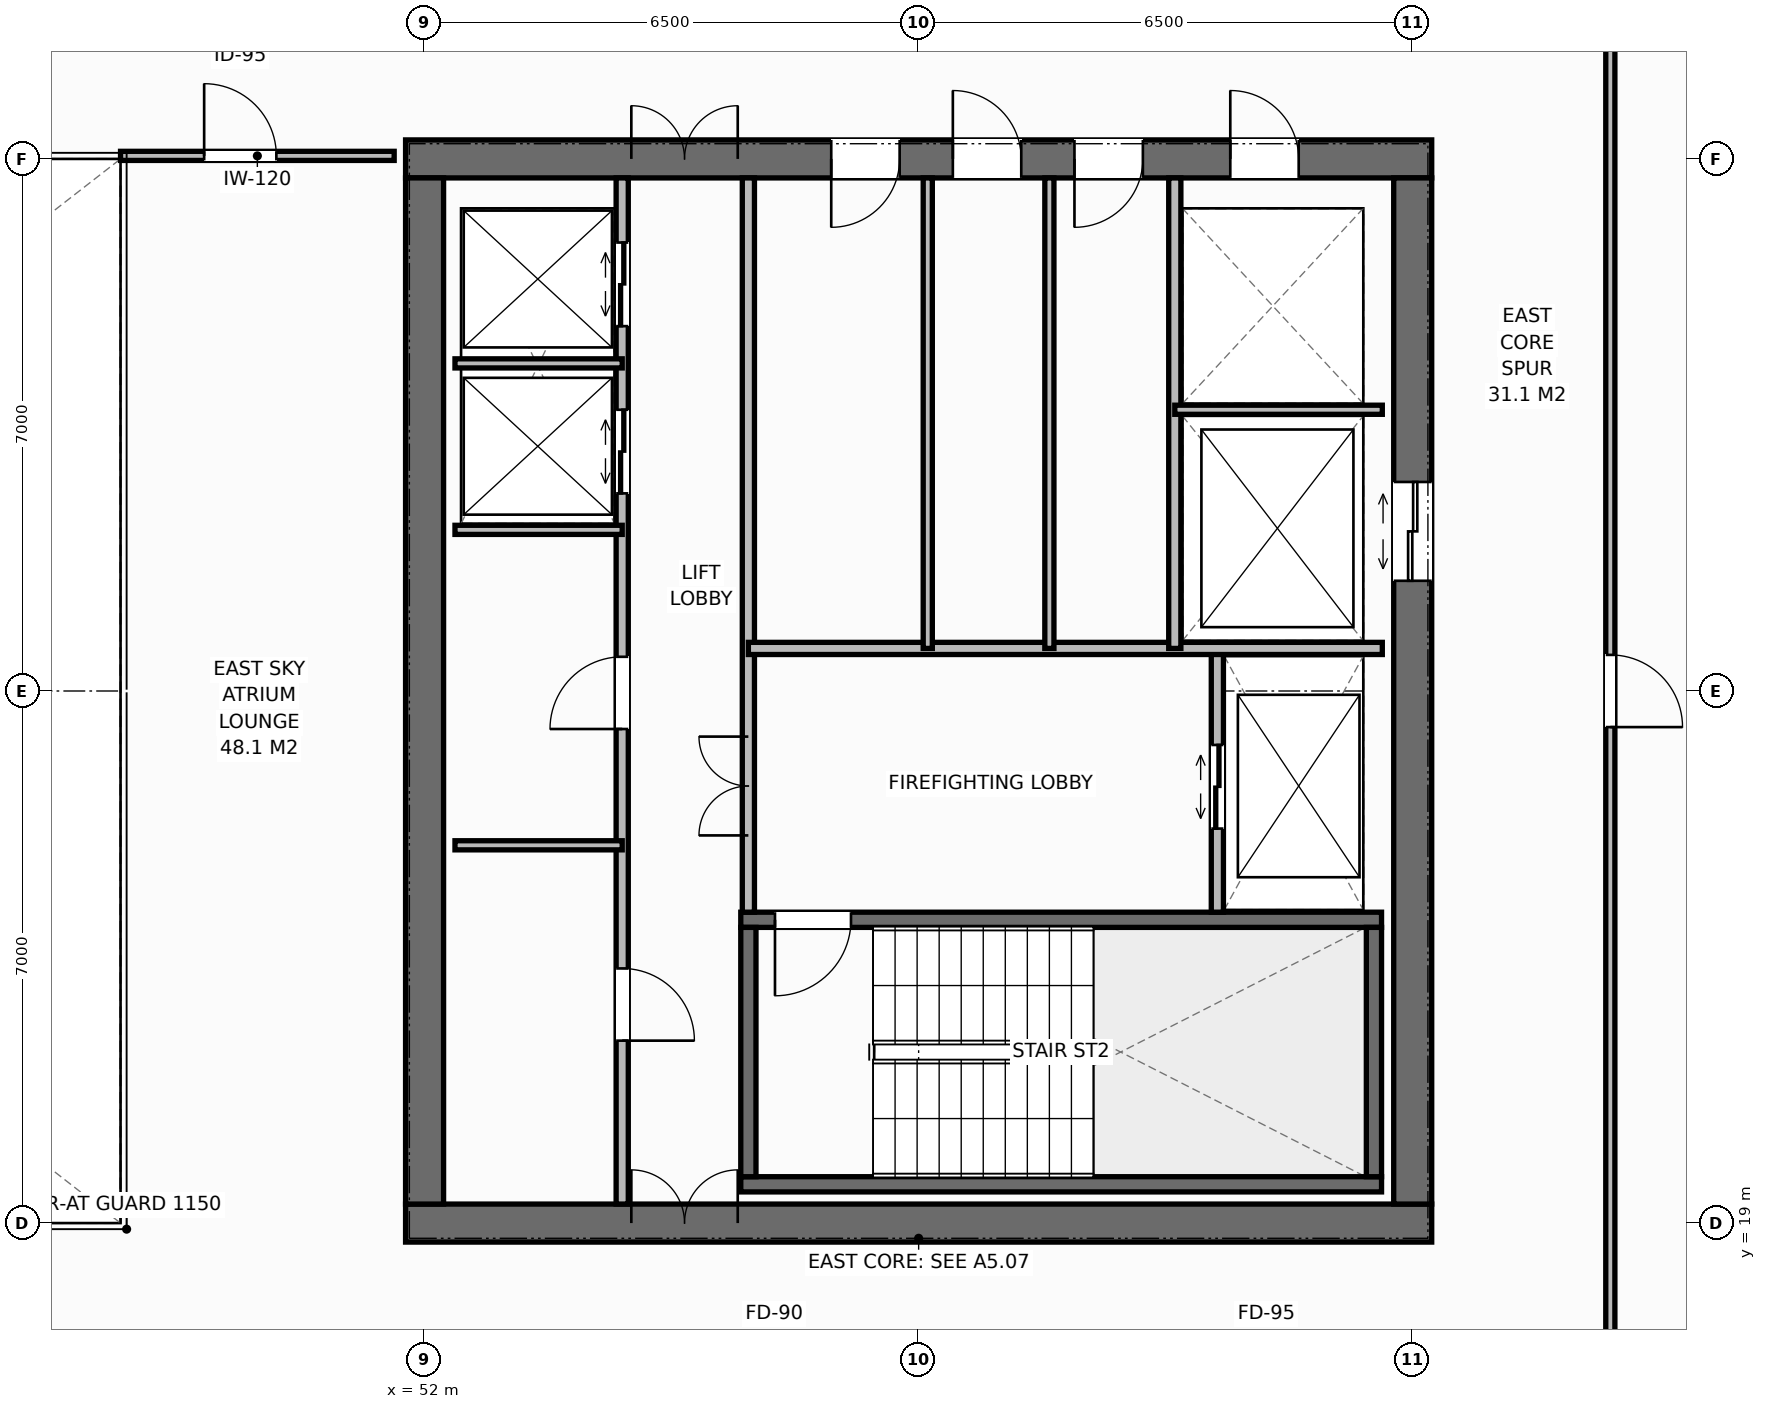
"""IFC4 building model, lengths in metres.
Left out: names, types, materials, properties, quantities, classifications, styles, units other than length and angle.
Written with IfcOpenShell. Run it as: python <this file> out.ifc"""

import sys

from ifc_helpers import new_model, si_unit, direction, frame, frame_2d, origin, place, context, subcontext, project, spatial, rectangle, extrude, element, fill, save


model = new_model("IFC4")
c1 = context("Model", 3, precision=1e-05, world=origin(), true_north=direction((0.0, 1.0)))
c2 = subcontext(c1, "Body", "Model", "MODEL_VIEW")
j1 = project(units=[si_unit("LENGTHUNIT", "METRE"), si_unit("PLANEANGLEUNIT", "RADIAN")], contexts=[c1])
p1 = place(None, origin())
s1 = spatial("IfcSite", under=j1, at=p1, CompositionType="ELEMENT")
p2 = place(p1, origin())
s2 = spatial("IfcBuilding", under=s1, at=p2, CompositionType="ELEMENT")
p3 = place(p2, frame((0.0, 0.0, 217.6)))
s3 = spatial("IfcBuildingStorey", under=s2, at=p3, CompositionType="ELEMENT", Elevation=217.6)
p4 = place(p3, frame((51.75, 19.0, 0.0), z_axis=(0.0, 0.0, 1.0), x_axis=(1.0, 0.0, 0.0)))
e1 = element("IfcWall", 1, at=p4, inside=s3, PredefinedType="SHEAR", context=c2, shape_type="SweptSolid", body=[
    extrude(rectangle(XDim=13.5, YDim=0.5, at=frame_2d((6.75, 0.0))), origin(), (0.0, 0.0, 1.0), 3.8),
])
p5 = place(p4, frame((2.97, 0.0, 0.0)))
e2 = element("IfcOpeningElement", 2, at=p5, cuts=e1, PredefinedType="OPENING", context=c2, shape_type="SweptSolid", body=[
    extrude(rectangle(XDim=1.4, YDim=2.2, at=frame_2d((0.7, 1.1))), frame((0.0, 0.26, 0.0), z_axis=(0.0, -1.0, 0.0), x_axis=(1.0, 0.0, 0.0)), (0.0, 0.0, 1.0), 0.52),
])
p6 = place(p3, frame((51.75, 33.0, 0.0), z_axis=(0.0, 0.0, 1.0), x_axis=(1.0, 0.0, 0.0)))
e3 = element("IfcWall", 3, at=p6, inside=s3, PredefinedType="SHEAR", context=c2, shape_type="SweptSolid", body=[
    extrude(rectangle(XDim=13.5, YDim=0.5, at=frame_2d((6.75, 0.0))), origin(), (0.0, 0.0, 1.0), 3.8),
])
p7 = place(p6, frame((2.97, 0.0, 0.0)))
e4 = element("IfcOpeningElement", 4, at=p7, cuts=e3, PredefinedType="OPENING", context=c2, shape_type="SweptSolid", body=[
    extrude(rectangle(XDim=1.4, YDim=2.2, at=frame_2d((0.7, 1.1))), frame((0.0, 0.26, 0.0), z_axis=(0.0, -1.0, 0.0), x_axis=(1.0, 0.0, 0.0)), (0.0, 0.0, 1.0), 0.52),
])
p8 = place(p6, frame((10.85, 0.0, 0.0)))
e5 = element("IfcOpeningElement", 5, at=p8, cuts=e3, PredefinedType="OPENING", context=c2, shape_type="SweptSolid", body=[
    extrude(rectangle(XDim=0.9, YDim=2.15, at=frame_2d((0.45, 1.075))), frame((0.0, 0.26, 0.0), z_axis=(0.0, -1.0, 0.0), x_axis=(1.0, 0.0, 0.0)), (0.0, 0.0, 1.0), 0.52),
])
p9 = place(p6, frame((5.6, 0.0, 0.0)))
e6 = element("IfcOpeningElement", 6, at=p9, cuts=e3, PredefinedType="OPENING", context=c2, shape_type="SweptSolid", body=[
    extrude(rectangle(XDim=0.9, YDim=2.15, at=frame_2d((0.45, 1.075))), frame((0.0, 0.26, 0.0), z_axis=(0.0, -1.0, 0.0), x_axis=(1.0, 0.0, 0.0)), (0.0, 0.0, 1.0), 0.52),
])
p10 = place(p6, frame((7.2, 0.0, 0.0)))
e7 = element("IfcOpeningElement", 7, at=p10, cuts=e3, PredefinedType="OPENING", context=c2, shape_type="SweptSolid", body=[
    extrude(rectangle(XDim=0.9, YDim=2.15, at=frame_2d((0.45, 1.075))), frame((0.0, 0.26, 0.0), z_axis=(0.0, -1.0, 0.0), x_axis=(1.0, 0.0, 0.0)), (0.0, 0.0, 1.0), 0.52),
])
p11 = place(p6, frame((8.8, 0.0, 0.0)))
e8 = element("IfcOpeningElement", 8, at=p11, cuts=e3, PredefinedType="OPENING", context=c2, shape_type="SweptSolid", body=[
    extrude(rectangle(XDim=0.9, YDim=2.15, at=frame_2d((0.45, 1.075))), frame((0.0, 0.26, 0.0), z_axis=(0.0, -1.0, 0.0), x_axis=(1.0, 0.0, 0.0)), (0.0, 0.0, 1.0), 0.52),
])
p12 = place(p3, frame((52.0, 19.25, 0.0), z_axis=(0.0, 0.0, 1.0), x_axis=(0.0, 1.0, 0.0)))
e9 = element("IfcWall", 9, at=p12, inside=s3, PredefinedType="SHEAR", context=c2, shape_type="SweptSolid", body=[
    extrude(rectangle(XDim=13.5, YDim=0.5, at=frame_2d((6.75, 0.0))), origin(), (0.0, 0.0, 1.0), 3.8),
])
p13 = place(p3, frame((65.0, 19.25, 0.0), z_axis=(0.0, 0.0, 1.0), x_axis=(0.0, 1.0, 0.0)))
e10 = element("IfcWall", 10, at=p13, inside=s3, PredefinedType="SHEAR", context=c2, shape_type="SweptSolid", body=[
    extrude(rectangle(XDim=13.5, YDim=0.5, at=frame_2d((6.75, 0.0))), origin(), (0.0, 0.0, 1.0), 3.8),
])
p14 = place(p13, frame((8.2, 0.0, 0.0)))
e11 = element("IfcOpeningElement", 11, at=p14, cuts=e10, PredefinedType="OPENING", context=c2, shape_type="SweptSolid", body=[
    extrude(rectangle(XDim=1.3, YDim=2.2, at=frame_2d((0.65, 1.1))), frame((0.0, 0.26, 0.0), z_axis=(0.0, -1.0, 0.0), x_axis=(1.0, 0.0, 0.0)), (0.0, 0.0, 1.0), 0.52),
])
p15 = place(p3, frame((56.16, 19.51, 0.0), z_axis=(0.0, 0.0, 1.0), x_axis=(1.0, 0.0, 0.0)))
e12 = element("IfcWall", 12, at=p15, inside=s3, PredefinedType="SHEAR", context=c2, shape_type="SweptSolid", body=[
    extrude(rectangle(XDim=8.43, YDim=0.2, at=frame_2d((4.215, 0.0))), origin(), (0.0, 0.0, 1.0), 3.8),
])
p16 = place(p3, frame((56.16, 22.99, 0.0), z_axis=(0.0, 0.0, 1.0), x_axis=(1.0, 0.0, 0.0)))
e13 = element("IfcWall", 13, at=p16, inside=s3, PredefinedType="SHEAR", context=c2, shape_type="SweptSolid", body=[
    extrude(rectangle(XDim=8.43, YDim=0.2, at=frame_2d((4.215, 0.0))), origin(), (0.0, 0.0, 1.0), 3.8),
])
p17 = place(p16, frame((0.45, 0.0, 0.0)))
e14 = element("IfcOpeningElement", 14, at=p17, cuts=e13, PredefinedType="OPENING", context=c2, shape_type="SweptSolid", body=[
    extrude(rectangle(XDim=1.0, YDim=2.15, at=frame_2d((0.5, 1.075))), frame((0.0, 0.11, 0.0), z_axis=(0.0, -1.0, 0.0), x_axis=(1.0, 0.0, 0.0)), (0.0, 0.0, 1.0), 0.22),
])
for number, where, z_axis, x_axis in (
    (15, (56.26, 19.61, 0.0), (0.0, 0.0, 1.0), (0.0, 1.0, 0.0)),
    (16, (64.49, 19.61, 0.0), (0.0, 0.0, 1.0), (0.0, 1.0, 0.0)),
):
    element("IfcWall", number, at=place(p3, frame(where, z_axis=z_axis, x_axis=x_axis)), inside=s3, PredefinedType="SHEAR", context=c2, shape_type="SweptSolid", body=[
        extrude(rectangle(XDim=3.28, YDim=0.2, at=frame_2d((1.64, 0.0))), origin(), (0.0, 0.0, 1.0), 3.8),
    ])
p18 = place(p3, frame((54.6, 19.25, 0.0), z_axis=(0.0, 0.0, 1.0), x_axis=(0.0, 1.0, 0.0)))
e17 = element("IfcWall", 17, at=p18, inside=s3, PredefinedType="STANDARD", context=c2, shape_type="SweptSolid", body=[
    extrude(rectangle(XDim=13.5, YDim=0.16, at=frame_2d((6.75, 0.0))), origin(), (0.0, 0.0, 1.0), 3.58),
])
p19 = place(p18, frame((2.15, 0.0, 0.0)))
e18 = element("IfcOpeningElement", 18, at=p19, cuts=e17, PredefinedType="OPENING", context=c2, shape_type="SweptSolid", body=[
    extrude(rectangle(XDim=0.95, YDim=2.15, at=frame_2d((0.475, 1.075))), frame((0.0, 0.09, 0.0), z_axis=(0.0, -1.0, 0.0), x_axis=(1.0, 0.0, 0.0)), (0.0, 0.0, 1.0), 0.18),
])
p20 = place(p18, frame((6.25, 0.0, 0.0)))
e19 = element("IfcOpeningElement", 19, at=p20, cuts=e17, PredefinedType="OPENING", context=c2, shape_type="SweptSolid", body=[
    extrude(rectangle(XDim=0.95, YDim=2.15, at=frame_2d((0.475, 1.075))), frame((0.0, 0.09, 0.0), z_axis=(0.0, -1.0, 0.0), x_axis=(1.0, 0.0, 0.0)), (0.0, 0.0, 1.0), 0.18),
])
p21 = place(p18, frame((9.35, 0.0, 0.0)))
e20 = element("IfcOpeningElement", 20, at=p21, cuts=e17, PredefinedType="OPENING", context=c2, shape_type="SweptSolid", body=[
    extrude(rectangle(XDim=1.1, YDim=2.2, at=frame_2d((0.55, 1.1))), frame((0.0, 0.09, 0.0), z_axis=(0.0, -1.0, 0.0), x_axis=(1.0, 0.0, 0.0)), (0.0, 0.0, 1.0), 0.18),
])
p22 = place(p18, frame((11.55, 0.0, 0.0)))
e21 = element("IfcOpeningElement", 21, at=p22, cuts=e17, PredefinedType="OPENING", context=c2, shape_type="SweptSolid", body=[
    extrude(rectangle(XDim=1.1, YDim=2.2, at=frame_2d((0.55, 1.1))), frame((0.0, 0.09, 0.0), z_axis=(0.0, -1.0, 0.0), x_axis=(1.0, 0.0, 0.0)), (0.0, 0.0, 1.0), 0.18),
])
p23 = place(p3, frame((56.26, 23.09, 0.0), z_axis=(0.0, 0.0, 1.0), x_axis=(0.0, 1.0, 0.0)))
e22 = element("IfcWall", 22, at=p23, inside=s3, PredefinedType="STANDARD", context=c2, shape_type="SweptSolid", body=[
    extrude(rectangle(XDim=9.66, YDim=0.16, at=frame_2d((4.83, 0.0))), origin(), (0.0, 0.0, 1.0), 3.58),
])
p24 = place(p23, frame((1.01, 0.0, 0.0)))
e23 = element("IfcOpeningElement", 23, at=p24, cuts=e22, PredefinedType="OPENING", context=c2, shape_type="SweptSolid", body=[
    extrude(rectangle(XDim=1.3, YDim=2.2, at=frame_2d((0.65, 1.1))), frame((0.0, 0.09, 0.0), z_axis=(0.0, -1.0, 0.0), x_axis=(1.0, 0.0, 0.0)), (0.0, 0.0, 1.0), 0.18),
])
for number, where, z_axis, x_axis in (
    (24, (52.4, 23.97, 0.0), (0.0, 0.0, 1.0), (1.0, 0.0, 0.0)),
    (25, (52.4, 28.12, 0.0), (0.0, 0.0, 1.0), (1.0, 0.0, 0.0)),
    (26, (52.4, 30.31, 0.0), (0.0, 0.0, 1.0), (1.0, 0.0, 0.0)),
):
    element("IfcWall", number, at=place(p3, frame(where, z_axis=z_axis, x_axis=x_axis)), inside=s3, PredefinedType="PARTITIONING", context=c2, shape_type="SweptSolid", body=[
        extrude(rectangle(XDim=2.2, YDim=0.12, at=frame_2d((1.1, 0.0))), origin(), (0.0, 0.0, 1.0), 3.58),
    ])
p25 = place(p3, frame((62.43, 23.09, 0.0), z_axis=(0.0, 0.0, 1.0), x_axis=(0.0, 1.0, 0.0)))
e27 = element("IfcWall", 27, at=p25, inside=s3, PredefinedType="STANDARD", context=c2, shape_type="SweptSolid", body=[
    extrude(rectangle(XDim=3.47, YDim=0.16, at=frame_2d((1.735, 0.0))), origin(), (0.0, 0.0, 1.0), 3.58),
])
p26 = place(p25, frame((1.1, 0.0, 0.0)))
e28 = element("IfcOpeningElement", 28, at=p26, cuts=e27, PredefinedType="OPENING", context=c2, shape_type="SweptSolid", body=[
    extrude(rectangle(XDim=1.1, YDim=2.2, at=frame_2d((0.55, 1.1))), frame((0.0, 0.09, 0.0), z_axis=(0.0, -1.0, 0.0), x_axis=(1.0, 0.0, 0.0)), (0.0, 0.0, 1.0), 0.18),
])
p27 = place(p3, frame((56.26, 26.56, 0.0), z_axis=(0.0, 0.0, 1.0), x_axis=(1.0, 0.0, 0.0)))
e29 = element("IfcWall", 29, at=p27, inside=s3, PredefinedType="STANDARD", context=c2, shape_type="SweptSolid", body=[
    extrude(rectangle(XDim=8.34, YDim=0.16, at=frame_2d((4.17, 0.0))), origin(), (0.0, 0.0, 1.0), 3.58),
])
p28 = place(p3, frame((61.87, 26.56, 0.0), z_axis=(0.0, 0.0, 1.0), x_axis=(0.0, 1.0, 0.0)))
e30 = element("IfcWall", 30, at=p28, inside=s3, PredefinedType="STANDARD", context=c2, shape_type="SweptSolid", body=[
    extrude(rectangle(XDim=6.19, YDim=0.16, at=frame_2d((3.095, 0.0))), origin(), (0.0, 0.0, 1.0), 3.58),
])
p29 = place(p3, frame((61.87, 29.7, 0.0), z_axis=(0.0, 0.0, 1.0), x_axis=(1.0, 0.0, 0.0)))
e31 = element("IfcWall", 31, at=p29, inside=s3, PredefinedType="PARTITIONING", context=c2, shape_type="SweptSolid", body=[
    extrude(rectangle(XDim=2.73, YDim=0.12, at=frame_2d((1.365, 0.0))), origin(), (0.0, 0.0, 1.0), 3.58),
])
for number, where, z_axis, x_axis in (
    (32, (58.62, 26.56, 0.0), (0.0, 0.0, 1.0), (0.0, 1.0, 0.0)),
    (33, (60.22, 26.56, 0.0), (0.0, 0.0, 1.0), (0.0, 1.0, 0.0)),
):
    element("IfcWall", number, at=place(p3, frame(where, z_axis=z_axis, x_axis=x_axis)), inside=s3, PredefinedType="PARTITIONING", context=c2, shape_type="SweptSolid", body=[
        extrude(rectangle(XDim=6.19, YDim=0.12, at=frame_2d((3.095, 0.0))), origin(), (0.0, 0.0, 1.0), 3.58),
    ])
p30 = place(p3, frame((48.0, 33.04, 0.0), z_axis=(0.0, 0.0, 1.0), x_axis=(1.0, 0.0, 0.0)))
e34 = element("IfcWall", 34, at=p30, inside=s3, PredefinedType="PARTITIONING", context=c2, shape_type="SweptSolid", body=[
    extrude(rectangle(XDim=3.6, YDim=0.12, at=frame_2d((1.8, 0.0))), origin(), (0.0, 0.0, 1.0), 3.32),
])
p31 = place(p30, frame((1.1, 0.0, 0.0)))
e35 = element("IfcOpeningElement", 35, at=p31, cuts=e34, PredefinedType="OPENING", context=c2, shape_type="SweptSolid", body=[
    extrude(rectangle(XDim=0.95, YDim=2.15, at=frame_2d((0.475, 1.075))), frame((0.0, 0.07, 0.0), z_axis=(0.0, -1.0, 0.0), x_axis=(1.0, 0.0, 0.0)), (0.0, 0.0, 1.0), 0.14),
])
p32 = place(p3, frame((67.6, 16.5, 0.0), z_axis=(0.0, 0.0, 1.0), x_axis=(0.0, 1.0, 0.0)))
e36 = element("IfcWall", 36, at=p32, inside=s3, PredefinedType="PARTITIONING", context=c2, shape_type="SweptSolid", body=[
    extrude(rectangle(XDim=19.0, YDim=0.12, at=frame_2d((9.5, 0.0))), origin(), (0.0, 0.0, 1.0), 3.58),
])
p33 = place(p32, frame((9.025, 0.0, 0.0)))
e37 = element("IfcOpeningElement", 37, at=p33, cuts=e36, PredefinedType="OPENING", context=c2, shape_type="SweptSolid", body=[
    extrude(rectangle(XDim=0.95, YDim=2.15, at=frame_2d((0.475, 1.075))), frame((0.0, 0.07, 0.0), z_axis=(0.0, -1.0, 0.0), x_axis=(1.0, 0.0, 0.0)), (0.0, 0.0, 1.0), 0.14),
])
p34 = place(p5, origin())
e38 = element("IfcDoor", 38, at=p34, inside=s3, OperationType="DOUBLE_DOOR_SINGLE_SWING", PredefinedType="DOOR", context=c2, shape_type="SweptSolid", body=[
    extrude(rectangle(XDim=1.4, YDim=2.2, at=frame_2d((0.7, 1.1))), frame((0.0, 0.075, 0.0), z_axis=(0.0, -1.0, 0.0), x_axis=(1.0, 0.0, 0.0)), (0.0, 0.0, 1.0), 0.05),
])
fill(e2, e38)
p35 = place(p7, origin())
e39 = element("IfcDoor", 39, at=p35, inside=s3, OperationType="DOUBLE_DOOR_SINGLE_SWING", PredefinedType="DOOR", context=c2, shape_type="SweptSolid", body=[
    extrude(rectangle(XDim=1.4, YDim=2.2, at=frame_2d((0.7, 1.1))), frame((0.0, -0.025, 0.0), z_axis=(0.0, -1.0, 0.0), x_axis=(1.0, 0.0, 0.0)), (0.0, 0.0, 1.0), 0.05),
])
fill(e4, e39)
p36 = place(p19, origin())
e40 = element("IfcDoor", 40, at=p36, inside=s3, OperationType="SINGLE_SWING_RIGHT", PredefinedType="DOOR", context=c2, shape_type="SweptSolid", body=[
    extrude(rectangle(XDim=0.95, YDim=2.15, at=frame_2d((0.475, 1.075))), frame((0.0, 0.025, 0.0), z_axis=(0.0, -1.0, 0.0), x_axis=(1.0, 0.0, 0.0)), (0.0, 0.0, 1.0), 0.05),
])
fill(e18, e40)
p37 = place(p20, origin())
e41 = element("IfcDoor", 41, at=p37, inside=s3, OperationType="SINGLE_SWING_LEFT", PredefinedType="DOOR", context=c2, shape_type="SweptSolid", body=[
    extrude(rectangle(XDim=0.95, YDim=2.15, at=frame_2d((0.475, 1.075))), frame((0.0, 0.025, 0.0), z_axis=(0.0, -1.0, 0.0), x_axis=(1.0, 0.0, 0.0)), (0.0, 0.0, 1.0), 0.05),
])
fill(e19, e41)
p38 = place(p21, origin())
e42 = element("IfcDoor", 42, at=p38, inside=s3, OperationType="DOUBLE_DOOR_SLIDING", PredefinedType="DOOR", context=c2, shape_type="SweptSolid", body=[
    extrude(rectangle(XDim=1.1, YDim=2.2, at=frame_2d((0.55, 1.1))), frame((0.0, 0.025, 0.0), z_axis=(0.0, -1.0, 0.0), x_axis=(1.0, 0.0, 0.0)), (0.0, 0.0, 1.0), 0.05),
])
fill(e20, e42)
p39 = place(p22, origin())
e43 = element("IfcDoor", 43, at=p39, inside=s3, OperationType="DOUBLE_DOOR_SLIDING", PredefinedType="DOOR", context=c2, shape_type="SweptSolid", body=[
    extrude(rectangle(XDim=1.1, YDim=2.2, at=frame_2d((0.55, 1.1))), frame((0.0, 0.025, 0.0), z_axis=(0.0, -1.0, 0.0), x_axis=(1.0, 0.0, 0.0)), (0.0, 0.0, 1.0), 0.05),
])
fill(e21, e43)
p40 = place(p17, origin())
e44 = element("IfcDoor", 44, at=p40, inside=s3, OperationType="SINGLE_SWING_RIGHT", PredefinedType="DOOR", context=c2, shape_type="SweptSolid", body=[
    extrude(rectangle(XDim=1.0, YDim=2.15, at=frame_2d((0.5, 1.075))), frame((0.0, 0.025, 0.0), z_axis=(0.0, -1.0, 0.0), x_axis=(1.0, 0.0, 0.0)), (0.0, 0.0, 1.0), 0.05),
])
fill(e14, e44)
p41 = place(p26, origin())
e45 = element("IfcDoor", 45, at=p41, inside=s3, OperationType="DOUBLE_DOOR_SLIDING", PredefinedType="DOOR", context=c2, shape_type="SweptSolid", body=[
    extrude(rectangle(XDim=1.1, YDim=2.2, at=frame_2d((0.55, 1.1))), frame((0.0, 0.025, 0.0), z_axis=(0.0, -1.0, 0.0), x_axis=(1.0, 0.0, 0.0)), (0.0, 0.0, 1.0), 0.05),
])
fill(e28, e45)
p42 = place(p24, origin())
e46 = element("IfcDoor", 46, at=p42, inside=s3, OperationType="DOUBLE_DOOR_SINGLE_SWING", PredefinedType="DOOR", context=c2, shape_type="SweptSolid", body=[
    extrude(rectangle(XDim=1.3, YDim=2.2, at=frame_2d((0.65, 1.1))), frame((0.0, 0.025, 0.0), z_axis=(0.0, -1.0, 0.0), x_axis=(1.0, 0.0, 0.0)), (0.0, 0.0, 1.0), 0.05),
])
fill(e23, e46)
p43 = place(p14, origin())
e47 = element("IfcDoor", 47, at=p43, inside=s3, OperationType="DOUBLE_DOOR_SLIDING", PredefinedType="DOOR", context=c2, shape_type="SweptSolid", body=[
    extrude(rectangle(XDim=1.3, YDim=2.2, at=frame_2d((0.65, 1.1))), frame((0.0, 0.025, 0.0), z_axis=(0.0, -1.0, 0.0), x_axis=(1.0, 0.0, 0.0)), (0.0, 0.0, 1.0), 0.05),
])
fill(e11, e47)
p44 = place(p8, origin())
e48 = element("IfcDoor", 48, at=p44, inside=s3, OperationType="SINGLE_SWING_LEFT", PredefinedType="DOOR", context=c2, shape_type="SweptSolid", body=[
    extrude(rectangle(XDim=0.9, YDim=2.15, at=frame_2d((0.45, 1.075))), frame((0.0, -0.025, 0.0), z_axis=(0.0, -1.0, 0.0), x_axis=(1.0, 0.0, 0.0)), (0.0, 0.0, 1.0), 0.05),
])
fill(e5, e48)
p45 = place(p9, origin())
e49 = element("IfcDoor", 49, at=p45, inside=s3, OperationType="SINGLE_SWING_RIGHT", PredefinedType="DOOR", context=c2, shape_type="SweptSolid", body=[
    extrude(rectangle(XDim=0.9, YDim=2.15, at=frame_2d((0.45, 1.075))), frame((0.0, -0.025, 0.0), z_axis=(0.0, -1.0, 0.0), x_axis=(1.0, 0.0, 0.0)), (0.0, 0.0, 1.0), 0.05),
])
fill(e6, e49)
p46 = place(p10, origin())
e50 = element("IfcDoor", 50, at=p46, inside=s3, OperationType="SINGLE_SWING_LEFT", PredefinedType="DOOR", context=c2, shape_type="SweptSolid", body=[
    extrude(rectangle(XDim=0.9, YDim=2.15, at=frame_2d((0.45, 1.075))), frame((0.0, -0.025, 0.0), z_axis=(0.0, -1.0, 0.0), x_axis=(1.0, 0.0, 0.0)), (0.0, 0.0, 1.0), 0.05),
])
fill(e7, e50)
p47 = place(p11, origin())
e51 = element("IfcDoor", 51, at=p47, inside=s3, OperationType="SINGLE_SWING_RIGHT", PredefinedType="DOOR", context=c2, shape_type="SweptSolid", body=[
    extrude(rectangle(XDim=0.9, YDim=2.15, at=frame_2d((0.45, 1.075))), frame((0.0, -0.025, 0.0), z_axis=(0.0, -1.0, 0.0), x_axis=(1.0, 0.0, 0.0)), (0.0, 0.0, 1.0), 0.05),
])
fill(e8, e51)
p48 = place(p31, origin())
e52 = element("IfcDoor", 52, at=p48, inside=s3, OperationType="SINGLE_SWING_LEFT", PredefinedType="DOOR", context=c2, shape_type="SweptSolid", body=[
    extrude(rectangle(XDim=0.95, YDim=2.15, at=frame_2d((0.475, 1.075))), frame((0.0, 0.025, 0.0), z_axis=(0.0, -1.0, 0.0), x_axis=(1.0, 0.0, 0.0)), (0.0, 0.0, 1.0), 0.05),
])
fill(e35, e52)
p49 = place(p33, origin())
e53 = element("IfcDoor", 53, at=p49, inside=s3, OperationType="SINGLE_SWING_RIGHT", PredefinedType="DOOR", context=c2, shape_type="SweptSolid", body=[
    extrude(rectangle(XDim=0.95, YDim=2.15, at=frame_2d((0.475, 1.075))), frame((0.0, 0.025, 0.0), z_axis=(0.0, -1.0, 0.0), x_axis=(1.0, 0.0, 0.0)), (0.0, 0.0, 1.0), 0.05),
])
fill(e37, e53)
save(model, sys.argv[1])
